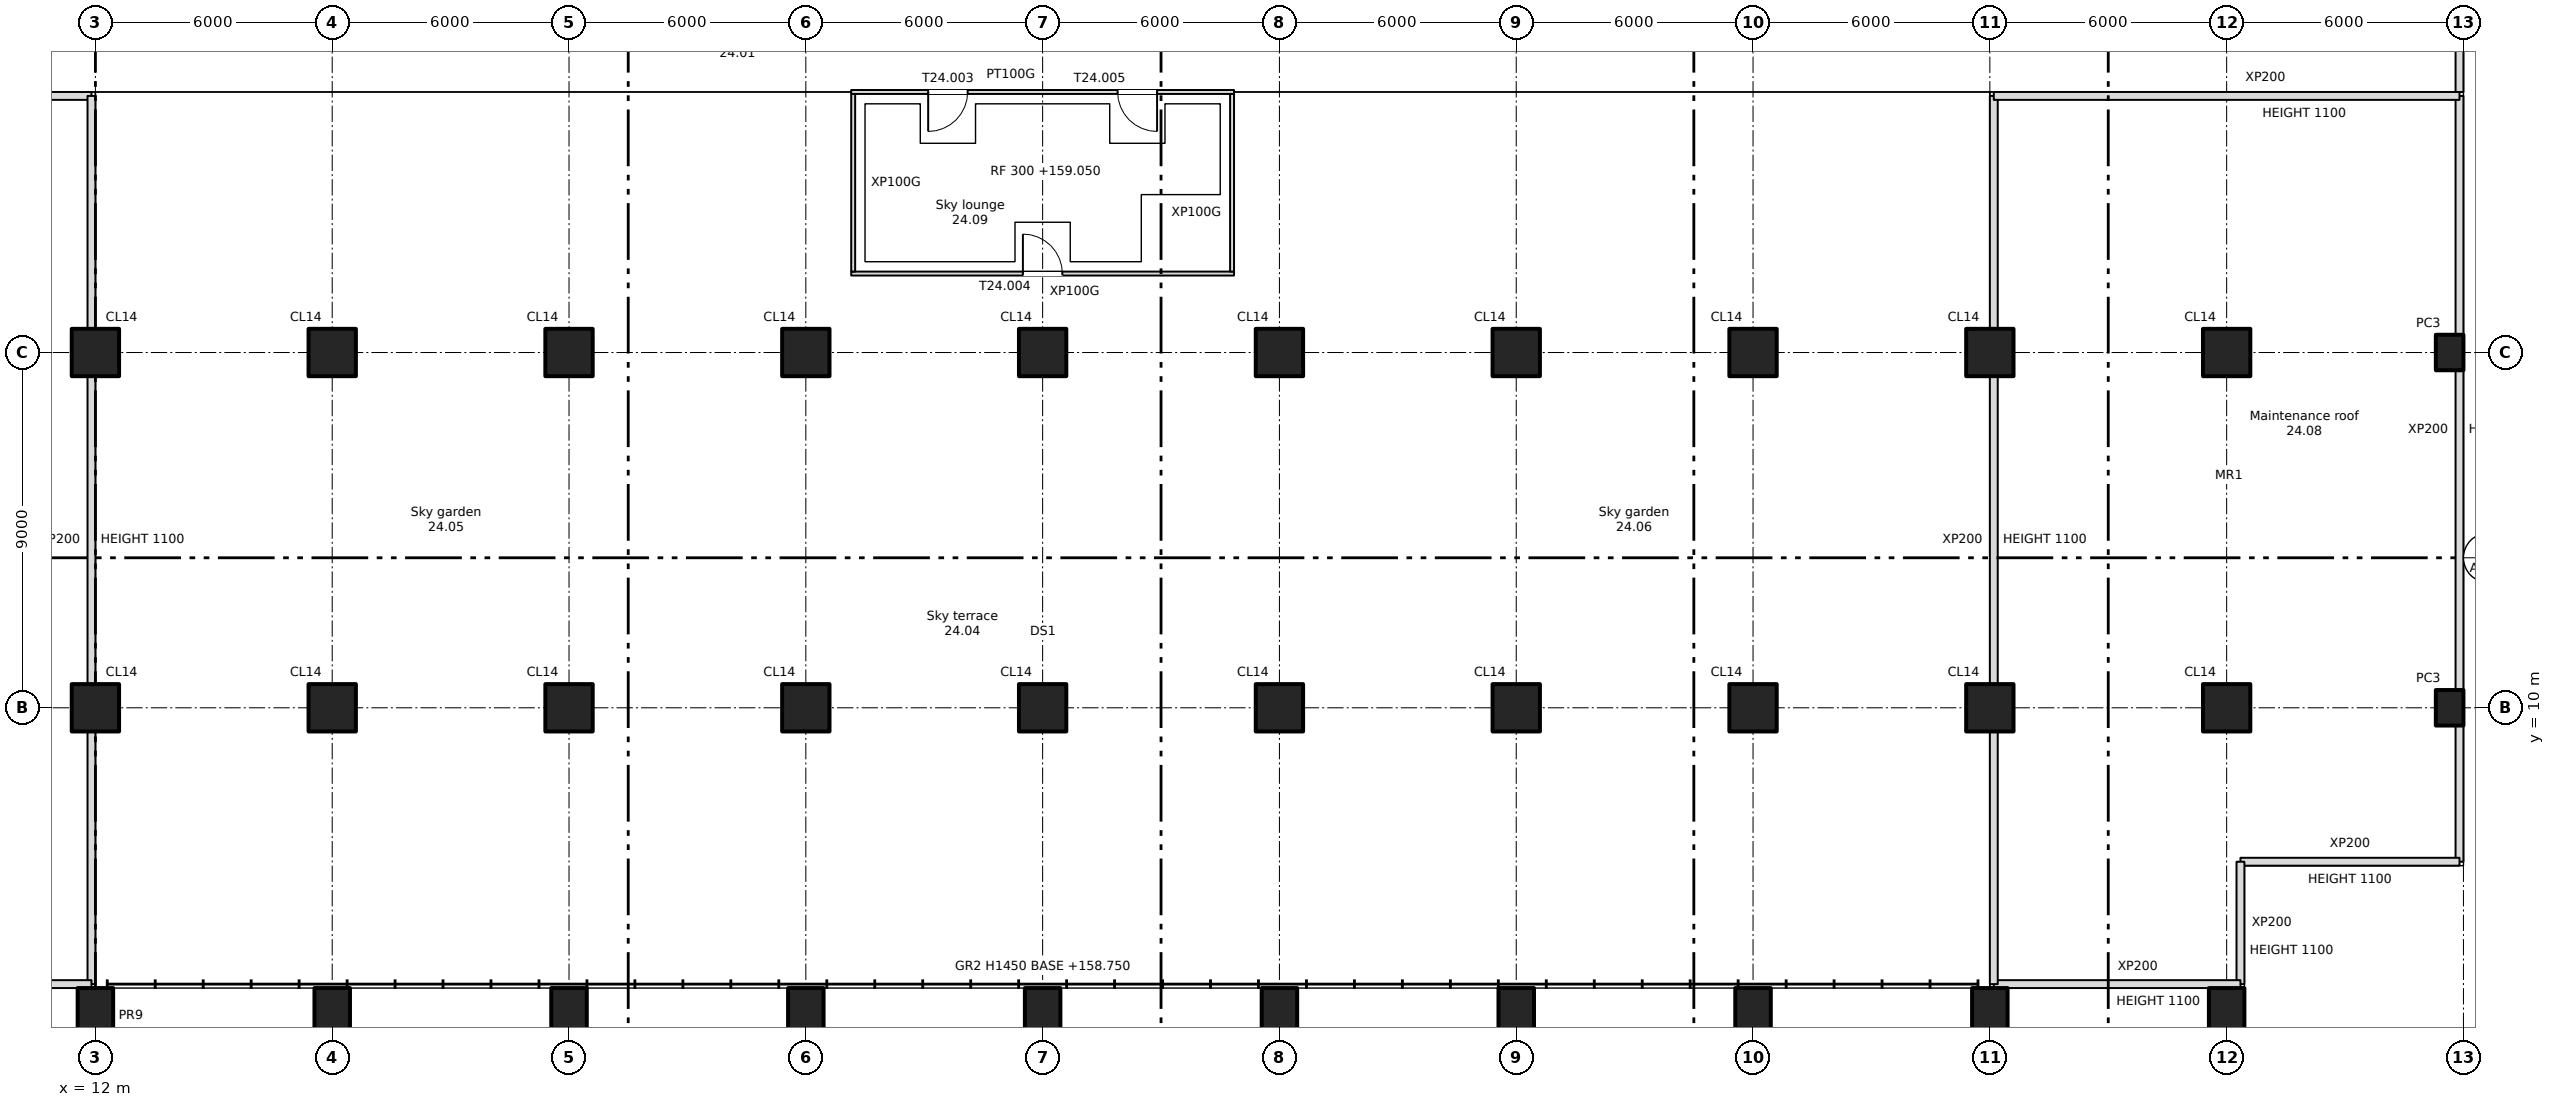
"""IFC4 building model, lengths in metres.
Left out: names, types, materials, properties, quantities, classifications, styles, units other than length and angle.
Written with IfcOpenShell. Run it as: python <this file> out.ifc"""

import sys

from ifc_helpers import new_model, si_unit, direction, frame, frame_2d, origin, origin_2d, place, context, subcontext, project, spatial, rectangle, extrude, element, fill, save


model = new_model("IFC4")
c1 = context("Model", 3, precision=1e-05, world=origin(), true_north=direction((0.0, 1.0)))
c2 = subcontext(c1, "Body", "Model", "MODEL_VIEW")
j1 = project(units=[si_unit("LENGTHUNIT", "METRE"), si_unit("PLANEANGLEUNIT", "RADIAN")], contexts=[c1])
p1 = place(None, origin())
s1 = spatial("IfcSite", under=j1, at=p1, CompositionType="ELEMENT")
p2 = place(p1, origin())
s2 = spatial("IfcBuilding", under=s1, at=p2, CompositionType="ELEMENT")
p3 = place(p2, frame((0.0, 0.0, 158.75)))
s3 = spatial("IfcBuildingStorey", under=s2, at=p3, CompositionType="ELEMENT", Elevation=158.75)
for number, where, z_axis, x_axis in (
    (1, (12.0, 2.2, -0.6), (0.0, 0.0, 1.0), (1.0, 0.0, 0.0)),
    (2, (18.0, 2.2, -0.6), (0.0, 0.0, 1.0), (1.0, 0.0, 0.0)),
    (3, (24.0, 2.2, -0.6), (0.0, 0.0, 1.0), (1.0, 0.0, 0.0)),
    (4, (30.0, 2.2, -0.6), (0.0, 0.0, 1.0), (1.0, 0.0, 0.0)),
    (5, (36.0, 2.2, -0.6), (0.0, 0.0, 1.0), (1.0, 0.0, 0.0)),
    (6, (42.0, 2.2, -0.6), (0.0, 0.0, 1.0), (1.0, 0.0, 0.0)),
    (7, (48.0, 2.2, -0.6), (0.0, 0.0, 1.0), (1.0, 0.0, 0.0)),
    (8, (54.0, 2.2, -0.6), (0.0, 0.0, 1.0), (1.0, 0.0, 0.0)),
    (9, (60.0, 2.2, -0.6), (0.0, 0.0, 1.0), (1.0, 0.0, 0.0)),
    (10, (66.0, 2.2, -0.6), (0.0, 0.0, 1.0), (1.0, 0.0, 0.0)),
):
    element("IfcColumn", number, at=place(p3, frame(where, z_axis=z_axis, x_axis=x_axis)), inside=s3, PredefinedType="COLUMN", context=c2, shape_type="SweptSolid", body=[
        extrude(rectangle(XDim=0.9, YDim=1.4, at=origin_2d()), origin(), (0.0, 0.0, 1.0), 7.8),
    ])
for number, where, z_axis, x_axis in (
    (11, (12.0, 10.0, 0.0), (0.0, 0.0, 1.0), (1.0, 0.0, 0.0)),
    (12, (12.0, 19.0, 0.0), (0.0, 0.0, 1.0), (1.0, 0.0, 0.0)),
    (13, (18.0, 10.0, 0.0), (0.0, 0.0, 1.0), (1.0, 0.0, 0.0)),
    (14, (18.0, 19.0, 0.0), (0.0, 0.0, 1.0), (1.0, 0.0, 0.0)),
    (15, (24.0, 10.0, 0.0), (0.0, 0.0, 1.0), (1.0, 0.0, 0.0)),
    (16, (24.0, 19.0, 0.0), (0.0, 0.0, 1.0), (1.0, 0.0, 0.0)),
    (17, (30.0, 10.0, 0.0), (0.0, 0.0, 1.0), (1.0, 0.0, 0.0)),
    (18, (30.0, 19.0, 0.0), (0.0, 0.0, 1.0), (1.0, 0.0, 0.0)),
    (19, (36.0, 10.0, 0.0), (0.0, 0.0, 1.0), (1.0, 0.0, 0.0)),
    (20, (36.0, 19.0, 0.0), (0.0, 0.0, 1.0), (1.0, 0.0, 0.0)),
    (21, (42.0, 10.0, 0.0), (0.0, 0.0, 1.0), (1.0, 0.0, 0.0)),
    (22, (42.0, 19.0, 0.0), (0.0, 0.0, 1.0), (1.0, 0.0, 0.0)),
    (23, (48.0, 10.0, 0.0), (0.0, 0.0, 1.0), (1.0, 0.0, 0.0)),
    (24, (48.0, 19.0, 0.0), (0.0, 0.0, 1.0), (1.0, 0.0, 0.0)),
    (25, (54.0, 10.0, 0.0), (0.0, 0.0, 1.0), (1.0, 0.0, 0.0)),
    (26, (54.0, 19.0, 0.0), (0.0, 0.0, 1.0), (1.0, 0.0, 0.0)),
    (27, (60.0, 10.0, 0.0), (0.0, 0.0, 1.0), (1.0, 0.0, 0.0)),
    (28, (60.0, 19.0, 0.0), (0.0, 0.0, 1.0), (1.0, 0.0, 0.0)),
    (29, (66.0, 10.0, 0.0), (0.0, 0.0, 1.0), (1.0, 0.0, 0.0)),
    (30, (66.0, 19.0, 0.0), (0.0, 0.0, 1.0), (1.0, 0.0, 0.0)),
):
    element("IfcColumn", number, at=place(p3, frame(where, z_axis=z_axis, x_axis=x_axis)), inside=s3, PredefinedType="COLUMN", context=c2, shape_type="SweptSolid", body=[
        extrude(rectangle(XDim=1.2, YDim=1.2, at=origin_2d()), origin(), (0.0, 0.0, 1.0), 7.2),
    ])
for number, where, z_axis, x_axis in (
    (31, (71.65, 10.0, 0.0), (0.0, 0.0, 1.0), (1.0, 0.0, 0.0)),
    (32, (71.65, 19.0, 0.0), (0.0, 0.0, 1.0), (1.0, 0.0, 0.0)),
):
    element("IfcColumn", number, at=place(p3, frame(where, z_axis=z_axis, x_axis=x_axis)), inside=s3, PredefinedType="COLUMN", context=c2, shape_type="SweptSolid", body=[
        extrude(rectangle(XDim=0.7, YDim=0.9, at=origin_2d()), origin(), (0.0, 0.0, 1.0), 7.2),
    ])
p4 = place(p3, frame((31.15, 21.0, 0.0), z_axis=(0.0, 0.0, 1.0), x_axis=(1.0, 0.0, 0.0)))
e33 = element("IfcWall", 33, at=p4, inside=s3, PredefinedType="PARTITIONING", context=c2, shape_type="SweptSolid", body=[
    extrude(rectangle(XDim=9.7, YDim=0.1, at=frame_2d((4.85, 0.0))), origin(), (0.0, 0.0, 1.0), 7.2),
])
p5 = place(p4, frame((4.35, 0.0, 0.0)))
e34 = element("IfcOpeningElement", 34, at=p5, cuts=e33, PredefinedType="OPENING", context=c2, shape_type="SweptSolid", body=[
    extrude(rectangle(XDim=1.0, YDim=2.1, at=frame_2d((0.5, 1.05))), frame((0.0, 0.06, 0.0), z_axis=(0.0, -1.0, 0.0), x_axis=(1.0, 0.0, 0.0)), (0.0, 0.0, 1.0), 0.12),
])
p6 = place(p3, frame((31.15, 25.6, 0.0), z_axis=(0.0, 0.0, 1.0), x_axis=(1.0, 0.0, 0.0)))
e35 = element("IfcWall", 35, at=p6, inside=s3, PredefinedType="PARTITIONING", context=c2, shape_type="SweptSolid", body=[
    extrude(rectangle(XDim=9.7, YDim=0.1, at=frame_2d((4.85, 0.0))), origin(), (0.0, 0.0, 1.0), 7.2),
])
p7 = place(p6, frame((1.95, 0.0, 0.0)))
e36 = element("IfcOpeningElement", 36, at=p7, cuts=e35, PredefinedType="OPENING", context=c2, shape_type="SweptSolid", body=[
    extrude(rectangle(XDim=1.0, YDim=2.1, at=frame_2d((0.5, 1.05))), frame((0.0, 0.06, 0.0), z_axis=(0.0, -1.0, 0.0), x_axis=(1.0, 0.0, 0.0)), (0.0, 0.0, 1.0), 0.12),
])
p8 = place(p6, frame((6.75, 0.0, 0.0)))
e37 = element("IfcOpeningElement", 37, at=p8, cuts=e35, PredefinedType="OPENING", context=c2, shape_type="SweptSolid", body=[
    extrude(rectangle(XDim=1.0, YDim=2.1, at=frame_2d((0.5, 1.05))), frame((0.0, 0.06, 0.0), z_axis=(0.0, -1.0, 0.0), x_axis=(1.0, 0.0, 0.0)), (0.0, 0.0, 1.0), 0.12),
])
for number, where, z_axis, x_axis in (
    (38, (31.2, 21.05, 0.0), (0.0, 0.0, 1.0), (0.0, 1.0, 0.0)),
    (39, (40.8, 21.05, 0.0), (0.0, 0.0, 1.0), (0.0, 1.0, 0.0)),
):
    element("IfcWall", number, at=place(p3, frame(where, z_axis=z_axis, x_axis=x_axis)), inside=s3, PredefinedType="PARTITIONING", context=c2, shape_type="SweptSolid", body=[
        extrude(rectangle(XDim=4.5, YDim=0.1, at=frame_2d((2.25, 0.0))), origin(), (0.0, 0.0, 1.0), 7.2),
    ])
p9 = place(p3, frame((0.1, 25.5, 0.0), z_axis=(0.0, 0.0, 1.0), x_axis=(1.0, 0.0, 0.0)))
e40 = element("IfcWall", 40, at=p9, inside=s3, PredefinedType="PARTITIONING", context=c2, shape_type="SweptSolid", body=[
    extrude(rectangle(XDim=11.8, YDim=0.2, at=frame_2d((5.9, 0.0))), origin(), (0.0, 0.0, 1.0), 1.1),
])
p10 = place(p3, frame((11.9, 25.5, 0.0), z_axis=(0.0, 0.0, 1.0), x_axis=(0.0, -1.0, 0.0)))
e41 = element("IfcWall", 41, at=p10, inside=s3, PredefinedType="PARTITIONING", context=c2, shape_type="SweptSolid", body=[
    extrude(rectangle(XDim=22.5, YDim=0.2, at=frame_2d((11.25, 0.0))), origin(), (0.0, 0.0, 1.0), 1.1),
])
p11 = place(p3, frame((11.9, 3.0, 0.0), z_axis=(0.0, 0.0, 1.0), x_axis=(-1.0, 0.0, 0.0)))
e42 = element("IfcWall", 42, at=p11, inside=s3, PredefinedType="PARTITIONING", context=c2, shape_type="SweptSolid", body=[
    extrude(rectangle(XDim=6.25, YDim=0.2, at=frame_2d((3.125, 0.0))), origin(), (0.0, 0.0, 1.0), 1.1),
])
p12 = place(p3, frame((71.9, 25.5, 0.0), z_axis=(0.0, 0.0, 1.0), x_axis=(0.0, -1.0, 0.0)))
e43 = element("IfcWall", 43, at=p12, inside=s3, PredefinedType="PARTITIONING", context=c2, shape_type="SweptSolid", body=[
    extrude(rectangle(XDim=19.4, YDim=0.2, at=frame_2d((9.7, 0.0))), origin(), (0.0, 0.0, 1.0), 1.1),
])
p13 = place(p3, frame((71.9, 6.1, 0.0), z_axis=(0.0, 0.0, 1.0), x_axis=(-1.0, 0.0, 0.0)))
e44 = element("IfcWall", 44, at=p13, inside=s3, PredefinedType="PARTITIONING", context=c2, shape_type="SweptSolid", body=[
    extrude(rectangle(XDim=5.55, YDim=0.2, at=frame_2d((2.775, 0.0))), origin(), (0.0, 0.0, 1.0), 1.1),
])
p14 = place(p3, frame((66.35, 6.1, 0.0), z_axis=(0.0, 0.0, 1.0), x_axis=(0.0, -1.0, 0.0)))
e45 = element("IfcWall", 45, at=p14, inside=s3, PredefinedType="PARTITIONING", context=c2, shape_type="SweptSolid", body=[
    extrude(rectangle(XDim=3.1, YDim=0.2, at=frame_2d((1.55, 0.0))), origin(), (0.0, 0.0, 1.0), 1.1),
])
p15 = place(p3, frame((66.35, 3.0, 0.0), z_axis=(0.0, 0.0, 1.0), x_axis=(-1.0, 0.0, 0.0)))
e46 = element("IfcWall", 46, at=p15, inside=s3, PredefinedType="PARTITIONING", context=c2, shape_type="SweptSolid", body=[
    extrude(rectangle(XDim=6.25, YDim=0.2, at=frame_2d((3.125, 0.0))), origin(), (0.0, 0.0, 1.0), 1.1),
])
p16 = place(p3, frame((60.1, 3.0, 0.0), z_axis=(0.0, 0.0, 1.0), x_axis=(0.0, 1.0, 0.0)))
e47 = element("IfcWall", 47, at=p16, inside=s3, PredefinedType="PARTITIONING", context=c2, shape_type="SweptSolid", body=[
    extrude(rectangle(XDim=22.5, YDim=0.2, at=frame_2d((11.25, 0.0))), origin(), (0.0, 0.0, 1.0), 1.1),
])
p17 = place(p3, frame((60.1, 25.5, 0.0), z_axis=(0.0, 0.0, 1.0), x_axis=(1.0, 0.0, 0.0)))
e48 = element("IfcWall", 48, at=p17, inside=s3, PredefinedType="PARTITIONING", context=c2, shape_type="SweptSolid", body=[
    extrude(rectangle(XDim=11.8, YDim=0.2, at=frame_2d((5.9, 0.0))), origin(), (0.0, 0.0, 1.0), 1.1),
])
p18 = place(p3, frame((71.9, 25.6, 0.0), z_axis=(0.0, 0.0, 1.0), x_axis=(0.0, 1.0, 0.0)))
e49 = element("IfcWall", 49, at=p18, inside=s3, PredefinedType="PARTITIONING", context=c2, shape_type="SweptSolid", body=[
    extrude(rectangle(XDim=2.4, YDim=0.2, at=frame_2d((1.2, 0.0))), origin(), (0.0, 0.0, 1.0), 1.1),
])
p19 = place(p7, origin())
e50 = element("IfcDoor", 50, at=p19, inside=s3, OperationType="SINGLE_SWING_LEFT", PredefinedType="DOOR", context=c2, shape_type="SweptSolid", body=[
    extrude(rectangle(XDim=1.0, YDim=2.1, at=frame_2d((0.5, 1.05))), frame((0.0, 0.025, 0.0), z_axis=(0.0, -1.0, 0.0), x_axis=(1.0, 0.0, 0.0)), (0.0, 0.0, 1.0), 0.05),
])
fill(e36, e50)
p20 = place(p5, origin())
e51 = element("IfcDoor", 51, at=p20, inside=s3, OperationType="SINGLE_SWING_LEFT", PredefinedType="DOOR", context=c2, shape_type="SweptSolid", body=[
    extrude(rectangle(XDim=1.0, YDim=2.1, at=frame_2d((0.5, 1.05))), frame((0.0, 0.025, 0.0), z_axis=(0.0, -1.0, 0.0), x_axis=(1.0, 0.0, 0.0)), (0.0, 0.0, 1.0), 0.05),
])
fill(e34, e51)
p21 = place(p8, origin())
e52 = element("IfcDoor", 52, at=p21, inside=s3, OperationType="SINGLE_SWING_RIGHT", PredefinedType="DOOR", context=c2, shape_type="SweptSolid", body=[
    extrude(rectangle(XDim=1.0, YDim=2.1, at=frame_2d((0.5, 1.05))), frame((0.0, 0.025, 0.0), z_axis=(0.0, -1.0, 0.0), x_axis=(1.0, 0.0, 0.0)), (0.0, 0.0, 1.0), 0.05),
])
fill(e37, e52)
save(model, sys.argv[1])
